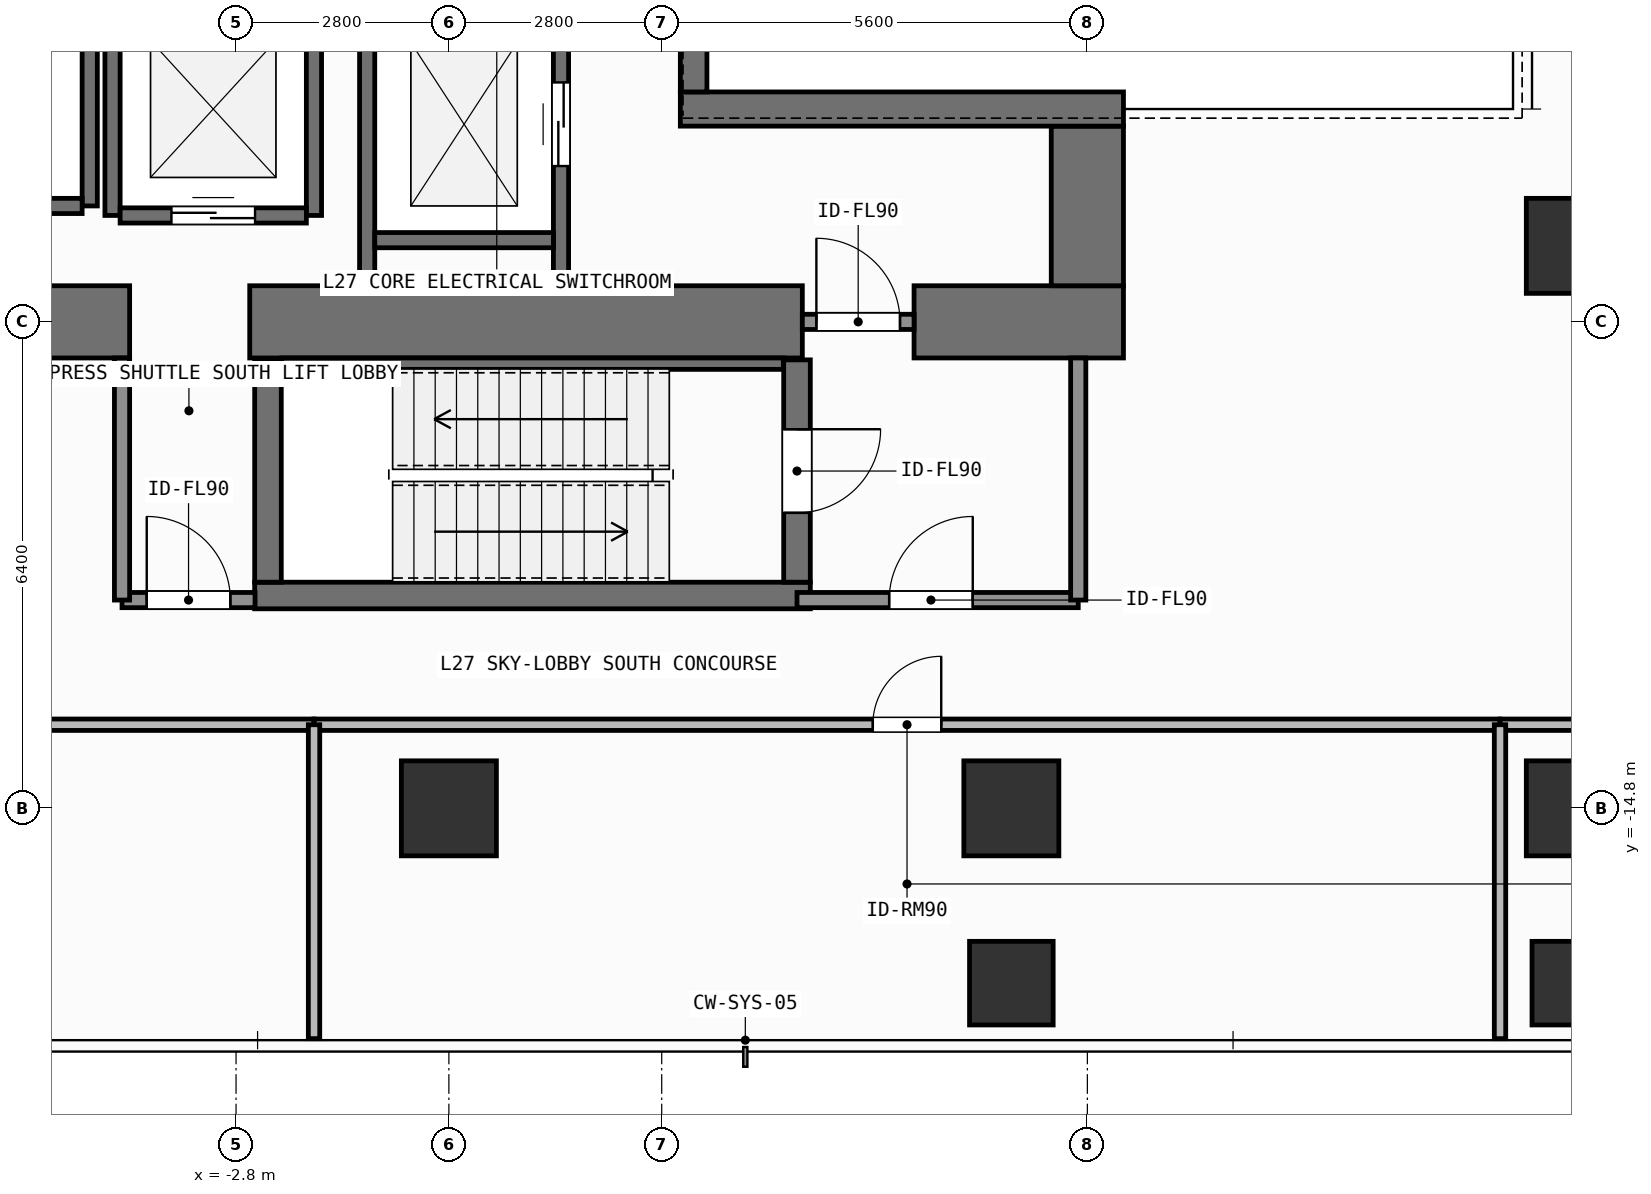
"""IFC4 building model, lengths in metres.
Left out: names, types, materials, properties, quantities, classifications, styles, units other than length and angle.
Written with IfcOpenShell. Run it as: python <this file> out.ifc"""

import sys

from ifc_helpers import new_model, si_unit, direction, frame, frame_2d, origin, origin_2d, place, context, subcontext, project, spatial, rectangle, extrude, element, fill, save


model = new_model("IFC4")
c1 = context("Model", 3, precision=1e-05, world=origin(), true_north=direction((0.0, 1.0)))
c2 = subcontext(c1, "Body", "Model", "MODEL_VIEW")
j1 = project(units=[si_unit("LENGTHUNIT", "METRE"), si_unit("PLANEANGLEUNIT", "RADIAN")], contexts=[c1])
p1 = place(None, origin())
s1 = spatial("IfcSite", under=j1, at=p1, CompositionType="ELEMENT")
p2 = place(p1, origin())
s2 = spatial("IfcBuilding", under=s1, at=p2, CompositionType="ELEMENT")
p3 = place(p2, frame((0.0, 0.0, 108.6)))
s3 = spatial("IfcBuildingStorey", under=s2, at=p3, CompositionType="ELEMENT", Elevation=108.6)
p4 = place(p3, frame((-7.55, -8.4, 0.0), z_axis=(0.0, 0.0, 1.0), x_axis=(1.0, 0.0, 0.0)))
e1 = element("IfcWall", 1, at=p4, inside=s3, PredefinedType="SHEAR", context=c2, shape_type="SweptSolid", body=[
    extrude(rectangle(XDim=3.35, YDim=0.95, at=frame_2d((1.675, 0.0))), origin(), (0.0, 0.0, 1.0), 4.8),
])
p5 = place(p3, frame((-2.62, -8.4, 0.0), z_axis=(0.0, 0.0, 1.0), x_axis=(1.0, 0.0, 0.0)))
e2 = element("IfcWall", 2, at=p5, inside=s3, PredefinedType="SHEAR", context=c2, shape_type="SweptSolid", body=[
    extrude(rectangle(XDim=7.27, YDim=0.95, at=frame_2d((3.635, 0.0))), origin(), (0.0, 0.0, 1.0), 4.8),
])
p6 = place(p3, frame((6.12, -8.4, 0.0), z_axis=(0.0, 0.0, 1.0), x_axis=(1.0, 0.0, 0.0)))
e3 = element("IfcWall", 3, at=p6, inside=s3, PredefinedType="SHEAR", context=c2, shape_type="SweptSolid", body=[
    extrude(rectangle(XDim=2.755, YDim=0.95, at=frame_2d((1.377, 0.0))), origin(), (0.0, 0.0, 1.0), 4.8),
])
p7 = place(p3, frame((8.4, -7.925, 0.0), z_axis=(0.0, 0.0, 1.0), x_axis=(0.0, 1.0, 0.0)))
e4 = element("IfcWall", 4, at=p7, inside=s3, PredefinedType="SHEAR", context=c2, shape_type="SweptSolid", body=[
    extrude(rectangle(XDim=2.1, YDim=0.95, at=frame_2d((1.05, 0.0))), origin(), (0.0, 0.0, 1.0), 4.8),
])
p8 = place(p3, frame((3.045, -5.6, 0.0), z_axis=(0.0, 0.0, 1.0), x_axis=(1.0, 0.0, 0.0)))
e5 = element("IfcWall", 5, at=p8, inside=s3, PredefinedType="SHEAR", context=c2, shape_type="SweptSolid", body=[
    extrude(rectangle(XDim=5.83, YDim=0.45, at=frame_2d((2.915, 0.0))), origin(), (0.0, 0.0, 1.0), 4.8),
])
p9 = place(p3, frame((3.22, -5.375, 0.0), z_axis=(0.0, 0.0, 1.0), x_axis=(0.0, 1.0, 0.0)))
e6 = element("IfcWall", 6, at=p9, inside=s3, PredefinedType="SHEAR", context=c2, shape_type="SweptSolid", body=[
    extrude(rectangle(XDim=10.75, YDim=0.35, at=frame_2d((5.375, 0.0))), origin(), (0.0, 0.0, 1.0), 4.8),
])
p10 = place(p3, frame((-2.555, -12.0, 0.0), z_axis=(0.0, 0.0, 1.0), x_axis=(1.0, 0.0, 0.0)))
e7 = element("IfcWall", 7, at=p10, inside=s3, PredefinedType="SHEAR", context=c2, shape_type="SweptSolid", body=[
    extrude(rectangle(XDim=7.31, YDim=0.35, at=frame_2d((3.655, 0.0))), origin(), (0.0, 0.0, 1.0), 4.8),
])
p11 = place(p3, frame((-2.2, -8.95, 0.0), z_axis=(0.0, 0.0, 1.0), x_axis=(1.0, 0.0, 0.0)))
e8 = element("IfcWall", 8, at=p11, inside=s3, PredefinedType="SHEAR", context=c2, shape_type="SweptSolid", body=[
    extrude(rectangle(XDim=6.6, YDim=0.15, at=frame_2d((3.3, 0.0))), origin(), (0.0, 0.0, 1.0), 4.8),
])
p12 = place(p3, frame((-2.38, -11.825, 0.0), z_axis=(0.0, 0.0, 1.0), x_axis=(0.0, 1.0, 0.0)))
e9 = element("IfcWall", 9, at=p12, inside=s3, PredefinedType="SHEAR", context=c2, shape_type="SweptSolid", body=[
    extrude(rectangle(XDim=2.925, YDim=0.35, at=frame_2d((1.462, 0.0))), origin(), (0.0, 0.0, 1.0), 4.8),
])
p13 = place(p3, frame((4.58, -8.9, 0.0), z_axis=(0.0, 0.0, 1.0), x_axis=(0.0, -1.0, 0.0)))
e10 = element("IfcWall", 10, at=p13, inside=s3, PredefinedType="SHEAR", context=c2, shape_type="SweptSolid", body=[
    extrude(rectangle(XDim=2.925, YDim=0.35, at=frame_2d((1.462, 0.0))), origin(), (0.0, 0.0, 1.0), 4.8),
])
p14 = place(p13, frame((0.913, 0.0, 0.0)))
e11 = element("IfcOpeningElement", 11, at=p14, cuts=e10, PredefinedType="OPENING", context=c2, shape_type="SweptSolid", body=[
    extrude(rectangle(XDim=1.1, YDim=2.15, at=frame_2d((0.55, 1.075))), frame((0.0, 0.185, 0.0), z_axis=(0.0, -1.0, 0.0), x_axis=(1.0, 0.0, 0.0)), (0.0, 0.0, 1.0), 0.37),
])
for number, where, z_axis, x_axis in (
    (12, (0.0, -14.8, 0.0), (0.0, 0.0, 1.0), (1.0, 0.0, 0.0)),
    (13, (7.4, -14.8, 0.0), (0.0, 0.0, 1.0), (1.0, 0.0, 0.0)),
    (14, (14.8, -14.8, 0.0), (0.0, 0.0, 1.0), (1.0, 0.0, 0.0)),
    (15, (14.8, -7.4, 0.0), (0.0, 0.0, 1.0), (1.0, 0.0, 0.0)),
):
    element("IfcColumn", number, at=place(p3, frame(where, z_axis=z_axis, x_axis=x_axis)), inside=s3, PredefinedType="COLUMN", context=c2, shape_type="SweptSolid", body=[
        extrude(rectangle(XDim=1.25, YDim=1.25, at=origin_2d()), origin(), (0.0, 0.0, 1.0), 4.8),
    ])
for number, where, z_axis, x_axis in (
    (16, (7.4, -17.1, 0.0), (0.0, 0.0, 1.0), (1.0, 0.0, 0.0)),
    (17, (14.8, -17.1, 0.0), (0.0, 0.0, 1.0), (1.0, 0.0, 0.0)),
):
    element("IfcColumn", number, at=place(p3, frame(where, z_axis=z_axis, x_axis=x_axis)), inside=s3, PredefinedType="COLUMN", context=c2, shape_type="SweptSolid", body=[
        extrude(rectangle(XDim=1.1, YDim=1.1, at=origin_2d()), origin(), (0.0, 0.0, 1.0), 4.8),
    ])
p15 = place(p3, frame((-4.725, -6.875, 0.0), z_axis=(0.0, 0.0, 1.0), x_axis=(0.0, 1.0, 0.0)))
e18 = element("IfcWall", 18, at=p15, inside=s3, PredefinedType="SHEAR", context=c2, shape_type="SweptSolid", body=[
    extrude(rectangle(XDim=2.55, YDim=0.2, at=frame_2d((1.275, 0.0))), origin(), (0.0, 0.0, 1.0), 4.58),
])
p16 = place(p3, frame((-7.175, -6.875, 0.0), z_axis=(0.0, 0.0, 1.0), x_axis=(1.0, 0.0, 0.0)))
e19 = element("IfcWall", 19, at=p16, inside=s3, PredefinedType="SHEAR", context=c2, shape_type="SweptSolid", body=[
    extrude(rectangle(XDim=2.35, YDim=0.2, at=frame_2d((1.175, 0.0))), origin(), (0.0, 0.0, 1.0), 4.58),
])
for number, where, z_axis, x_axis in (
    (20, (-4.425, -7.0, 0.0), (0.0, 0.0, 1.0), (0.0, 1.0, 0.0)),
    (21, (-1.775, -7.0, 0.0), (0.0, 0.0, 1.0), (0.0, 1.0, 0.0)),
):
    element("IfcWall", number, at=place(p3, frame(where, z_axis=z_axis, x_axis=x_axis)), inside=s3, PredefinedType="SHEAR", context=c2, shape_type="SweptSolid", body=[
        extrude(rectangle(XDim=2.8, YDim=0.2, at=frame_2d((1.4, 0.0))), origin(), (0.0, 0.0, 1.0), 4.58),
    ])
p17 = place(p3, frame((-4.325, -7.0, 0.0), z_axis=(0.0, 0.0, 1.0), x_axis=(1.0, 0.0, 0.0)))
e22 = element("IfcWall", 22, at=p17, inside=s3, PredefinedType="SHEAR", context=c2, shape_type="SweptSolid", body=[
    extrude(rectangle(XDim=2.45, YDim=0.2, at=frame_2d((1.225, 0.0))), origin(), (0.0, 0.0, 1.0), 4.58),
])
p18 = place(p17, frame((0.675, 0.0, 0.0)))
e23 = element("IfcOpeningElement", 23, at=p18, cuts=e22, PredefinedType="OPENING", context=c2, shape_type="SweptSolid", body=[
    extrude(rectangle(XDim=1.1, YDim=2.2, at=frame_2d((0.55, 1.1))), frame((0.0, 0.11, 0.0), z_axis=(0.0, -1.0, 0.0), x_axis=(1.0, 0.0, 0.0)), (0.0, 0.0, 1.0), 0.22),
])
p19 = place(p3, frame((-1.075, -7.925, 0.0), z_axis=(0.0, 0.0, 1.0), x_axis=(0.0, 1.0, 0.0)))
e24 = element("IfcWall", 24, at=p19, inside=s3, PredefinedType="SHEAR", context=c2, shape_type="SweptSolid", body=[
    extrude(rectangle(XDim=3.65, YDim=0.2, at=frame_2d((1.825, 0.0))), origin(), (0.0, 0.0, 1.0), 4.58),
])
p20 = place(p3, frame((1.475, -7.925, 0.0), z_axis=(0.0, 0.0, 1.0), x_axis=(0.0, 1.0, 0.0)))
e25 = element("IfcWall", 25, at=p20, inside=s3, PredefinedType="SHEAR", context=c2, shape_type="SweptSolid", body=[
    extrude(rectangle(XDim=3.65, YDim=0.2, at=frame_2d((1.825, 0.0))), origin(), (0.0, 0.0, 1.0), 4.58),
])
p21 = place(p20, frame((1.575, 0.0, 0.0)))
e26 = element("IfcOpeningElement", 26, at=p21, cuts=e25, PredefinedType="OPENING", context=c2, shape_type="SweptSolid", body=[
    extrude(rectangle(XDim=1.1, YDim=2.2, at=frame_2d((0.55, 1.1))), frame((0.0, 0.11, 0.0), z_axis=(0.0, -1.0, 0.0), x_axis=(1.0, 0.0, 0.0)), (0.0, 0.0, 1.0), 0.22),
])
p22 = place(p3, frame((-0.975, -7.325, 0.0), z_axis=(0.0, 0.0, 1.0), x_axis=(1.0, 0.0, 0.0)))
e27 = element("IfcWall", 27, at=p22, inside=s3, PredefinedType="SHEAR", context=c2, shape_type="SweptSolid", body=[
    extrude(rectangle(XDim=2.35, YDim=0.2, at=frame_2d((1.175, 0.0))), origin(), (0.0, 0.0, 1.0), 4.58),
])
p23 = place(p3, frame((4.58, -12.06, 0.0), z_axis=(0.0, 0.0, 1.0), x_axis=(1.0, 0.0, 0.0)))
e28 = element("IfcWall", 28, at=p23, inside=s3, PredefinedType="SOLIDWALL", context=c2, shape_type="SweptSolid", body=[
    extrude(rectangle(XDim=3.7, YDim=0.2, at=frame_2d((1.85, 0.0))), origin(), (0.0, 0.0, 1.0), 4.58),
])
p24 = place(p23, frame((1.212, 0.0, 0.0)))
e29 = element("IfcOpeningElement", 29, at=p24, cuts=e28, PredefinedType="OPENING", context=c2, shape_type="SweptSolid", body=[
    extrude(rectangle(XDim=1.1, YDim=2.15, at=frame_2d((0.55, 1.075))), frame((0.0, 0.11, 0.0), z_axis=(0.0, -1.0, 0.0), x_axis=(1.0, 0.0, 0.0)), (0.0, 0.0, 1.0), 0.22),
])
p25 = place(p3, frame((4.65, -8.4, 0.0), z_axis=(0.0, 0.0, 1.0), x_axis=(1.0, 0.0, 0.0)))
e30 = element("IfcWall", 30, at=p25, inside=s3, PredefinedType="SOLIDWALL", context=c2, shape_type="SweptSolid", body=[
    extrude(rectangle(XDim=1.47, YDim=0.2, at=frame_2d((0.735, 0.0))), origin(), (0.0, 0.0, 1.0), 3.62),
])
p26 = place(p25, frame((0.185, 0.0, 0.0)))
e31 = element("IfcOpeningElement", 31, at=p26, cuts=e30, PredefinedType="OPENING", context=c2, shape_type="SweptSolid", body=[
    extrude(rectangle(XDim=1.1, YDim=2.15, at=frame_2d((0.55, 1.075))), frame((0.0, 0.11, 0.0), z_axis=(0.0, -1.0, 0.0), x_axis=(1.0, 0.0, 0.0)), (0.0, 0.0, 1.0), 0.22),
])
p27 = place(p3, frame((-4.3, -12.06, 0.0), z_axis=(0.0, 0.0, 1.0), x_axis=(1.0, 0.0, 0.0)))
e32 = element("IfcWall", 32, at=p27, inside=s3, PredefinedType="SOLIDWALL", context=c2, shape_type="SweptSolid", body=[
    extrude(rectangle(XDim=1.75, YDim=0.2, at=frame_2d((0.875, 0.0))), origin(), (0.0, 0.0, 1.0), 4.58),
])
p28 = place(p27, frame((0.325, 0.0, 0.0)))
e33 = element("IfcOpeningElement", 33, at=p28, cuts=e32, PredefinedType="OPENING", context=c2, shape_type="SweptSolid", body=[
    extrude(rectangle(XDim=1.1, YDim=2.15, at=frame_2d((0.55, 1.075))), frame((0.0, 0.11, 0.0), z_axis=(0.0, -1.0, 0.0), x_axis=(1.0, 0.0, 0.0)), (0.0, 0.0, 1.0), 0.22),
])
p29 = place(p3, frame((-19.33, -13.7, 0.0), z_axis=(0.0, 0.0, 1.0), x_axis=(1.0, 0.0, 0.0)))
e34 = element("IfcWall", 34, at=p29, inside=s3, PredefinedType="PARTITIONING", context=c2, shape_type="SweptSolid", body=[
    extrude(rectangle(XDim=17.556, YDim=0.15, at=frame_2d((8.778, 0.0))), origin(), (0.0, 0.0, 1.0), 4.58),
])
p30 = place(p29, frame((9.506, 0.0, 0.0)))
e35 = element("IfcOpeningElement", 35, at=p30, cuts=e34, PredefinedType="OPENING", context=c2, shape_type="SweptSolid", body=[
    extrude(rectangle(XDim=1.6, YDim=2.3, at=frame_2d((0.8, 1.15))), frame((0.0, 0.085, 0.0), z_axis=(0.0, -1.0, 0.0), x_axis=(1.0, 0.0, 0.0)), (0.0, 0.0, 1.0), 0.17),
])
p31 = place(p3, frame((-1.774, -13.7, 0.0), z_axis=(0.0, 0.0, 1.0), x_axis=(1.0, 0.0, 0.0)))
e36 = element("IfcWall", 36, at=p31, inside=s3, PredefinedType="PARTITIONING", context=c2, shape_type="SweptSolid", body=[
    extrude(rectangle(XDim=15.603, YDim=0.15, at=frame_2d((7.802, 0.0))), origin(), (0.0, 0.0, 1.0), 4.58),
])
p32 = place(p31, frame((7.352, 0.0, 0.0)))
e37 = element("IfcOpeningElement", 37, at=p32, cuts=e36, PredefinedType="OPENING", context=c2, shape_type="SweptSolid", body=[
    extrude(rectangle(XDim=0.9, YDim=2.1, at=frame_2d((0.45, 1.05))), frame((0.0, 0.085, 0.0), z_axis=(0.0, -1.0, 0.0), x_axis=(1.0, 0.0, 0.0)), (0.0, 0.0, 1.0), 0.17),
])
p33 = place(p3, frame((13.829, -13.7, 0.0), z_axis=(0.0, 0.0, 1.0), x_axis=(1.0, 0.0, 0.0)))
e38 = element("IfcWall", 38, at=p33, inside=s3, PredefinedType="PARTITIONING", context=c2, shape_type="SweptSolid", body=[
    extrude(rectangle(XDim=13.301, YDim=0.15, at=frame_2d((6.65, 0.0))), origin(), (0.0, 0.0, 1.0), 4.58),
])
p34 = place(p33, frame((4.069, 0.0, 0.0)))
e39 = element("IfcOpeningElement", 39, at=p34, cuts=e38, PredefinedType="OPENING", context=c2, shape_type="SweptSolid", body=[
    extrude(rectangle(XDim=0.9, YDim=2.1, at=frame_2d((0.45, 1.05))), frame((0.0, 0.085, 0.0), z_axis=(0.0, -1.0, 0.0), x_axis=(1.0, 0.0, 0.0)), (0.0, 0.0, 1.0), 0.17),
])
for number, where, z_axis, x_axis in (
    (40, (8.28, -12.06, 0.0), (0.0, 0.0, 1.0), (0.0, 1.0, 0.0)),
    (41, (-4.3, -12.06, 0.0), (0.0, 0.0, 1.0), (0.0, 1.0, 0.0)),
):
    element("IfcWall", number, at=place(p3, frame(where, z_axis=z_axis, x_axis=x_axis)), inside=s3, PredefinedType="SOLIDWALL", context=c2, shape_type="SweptSolid", body=[
        extrude(rectangle(XDim=3.185, YDim=0.2, at=frame_2d((1.593, 0.0))), origin(), (0.0, 0.0, 1.0), 4.58),
    ])
for number, where, z_axis, x_axis in (
    (42, (-1.774, -17.83, 0.0), (0.0, 0.0, 1.0), (0.0, 1.0, 0.0)),
    (43, (13.829, -17.83, 0.0), (0.0, 0.0, 1.0), (0.0, 1.0, 0.0)),
):
    element("IfcWall", number, at=place(p3, frame(where, z_axis=z_axis, x_axis=x_axis)), inside=s3, PredefinedType="PARTITIONING", context=c2, shape_type="SweptSolid", body=[
        extrude(rectangle(XDim=4.13, YDim=0.15, at=frame_2d((2.065, 0.0))), origin(), (0.0, 0.0, 1.0), 4.58),
    ])
p35 = place(p18, origin())
e44 = element("IfcDoor", 44, at=p35, inside=s3, OperationType="SLIDING_TO_LEFT", PredefinedType="DOOR", context=c2, shape_type="SweptSolid", body=[
    extrude(rectangle(XDim=1.1, YDim=2.2, at=frame_2d((0.55, 1.1))), frame((0.0, 0.025, 0.0), z_axis=(0.0, -1.0, 0.0), x_axis=(1.0, 0.0, 0.0)), (0.0, 0.0, 1.0), 0.05),
])
fill(e23, e44)
p36 = place(p21, origin())
e45 = element("IfcDoor", 45, at=p36, inside=s3, OperationType="SLIDING_TO_LEFT", PredefinedType="DOOR", context=c2, shape_type="SweptSolid", body=[
    extrude(rectangle(XDim=1.1, YDim=2.2, at=frame_2d((0.55, 1.1))), frame((0.0, 0.025, 0.0), z_axis=(0.0, -1.0, 0.0), x_axis=(1.0, 0.0, 0.0)), (0.0, 0.0, 1.0), 0.05),
])
fill(e26, e45)
p37 = place(p14, origin())
e46 = element("IfcDoor", 46, at=p37, inside=s3, OperationType="SINGLE_SWING_LEFT", PredefinedType="DOOR", context=c2, shape_type="SweptSolid", body=[
    extrude(rectangle(XDim=1.1, YDim=2.15, at=frame_2d((0.55, 1.075))), frame((0.0, 0.025, 0.0), z_axis=(0.0, -1.0, 0.0), x_axis=(1.0, 0.0, 0.0)), (0.0, 0.0, 1.0), 0.05),
])
fill(e11, e46)
p38 = place(p24, origin())
e47 = element("IfcDoor", 47, at=p38, inside=s3, OperationType="SINGLE_SWING_RIGHT", PredefinedType="DOOR", context=c2, shape_type="SweptSolid", body=[
    extrude(rectangle(XDim=1.1, YDim=2.15, at=frame_2d((0.55, 1.075))), frame((0.0, 0.025, 0.0), z_axis=(0.0, -1.0, 0.0), x_axis=(1.0, 0.0, 0.0)), (0.0, 0.0, 1.0), 0.05),
])
fill(e29, e47)
p39 = place(p26, origin())
e48 = element("IfcDoor", 48, at=p39, inside=s3, OperationType="SINGLE_SWING_LEFT", PredefinedType="DOOR", context=c2, shape_type="SweptSolid", body=[
    extrude(rectangle(XDim=1.1, YDim=2.15, at=frame_2d((0.55, 1.075))), frame((0.0, 0.025, 0.0), z_axis=(0.0, -1.0, 0.0), x_axis=(1.0, 0.0, 0.0)), (0.0, 0.0, 1.0), 0.05),
])
fill(e31, e48)
p40 = place(p28, origin())
e49 = element("IfcDoor", 49, at=p40, inside=s3, OperationType="SINGLE_SWING_LEFT", PredefinedType="DOOR", context=c2, shape_type="SweptSolid", body=[
    extrude(rectangle(XDim=1.1, YDim=2.15, at=frame_2d((0.55, 1.075))), frame((0.0, 0.025, 0.0), z_axis=(0.0, -1.0, 0.0), x_axis=(1.0, 0.0, 0.0)), (0.0, 0.0, 1.0), 0.05),
])
fill(e33, e49)
p41 = place(p32, origin())
e50 = element("IfcDoor", 50, at=p41, inside=s3, OperationType="SINGLE_SWING_RIGHT", PredefinedType="DOOR", context=c2, shape_type="SweptSolid", body=[
    extrude(rectangle(XDim=0.9, YDim=2.1, at=frame_2d((0.45, 1.05))), frame((0.0, 0.025, 0.0), z_axis=(0.0, -1.0, 0.0), x_axis=(1.0, 0.0, 0.0)), (0.0, 0.0, 1.0), 0.05),
])
fill(e37, e50)
save(model, sys.argv[1])
